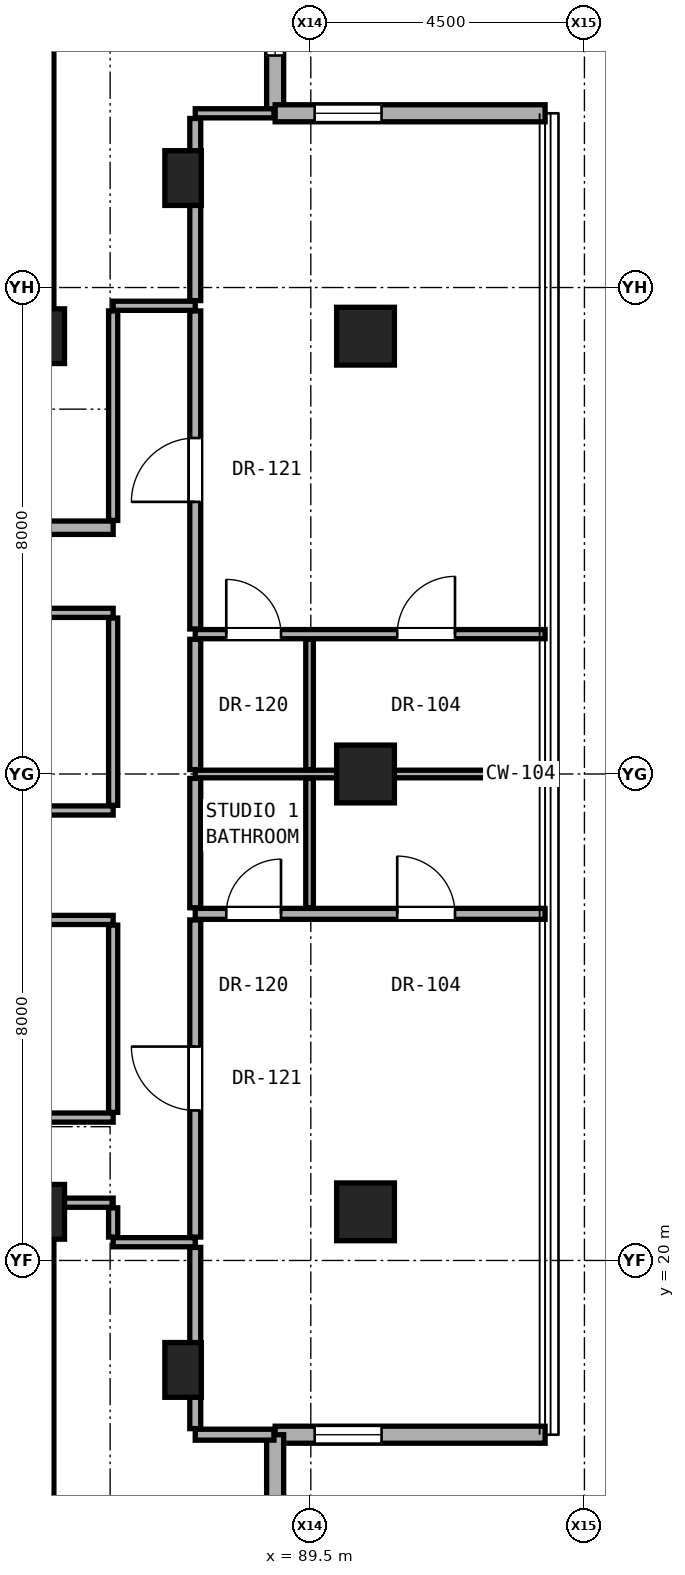
"""IFC4 building model, lengths in metres.
Left out: names, types, materials, properties, quantities, classifications, styles, units other than length and angle.
Written with IfcOpenShell. Run it as: python <this file> out.ifc"""

import sys

from ifc_helpers import new_model, si_unit, direction, frame, frame_2d, origin, origin_2d, place, context, subcontext, project, spatial, rectangle, hollow_rectangle, extrude, element, fill, save


model = new_model("IFC4")
c1 = context("Model", 3, precision=1e-05, world=origin(), true_north=direction((0.0, 1.0)))
c2 = subcontext(c1, "Body", "Model", "MODEL_VIEW")
j1 = project(units=[si_unit("LENGTHUNIT", "METRE"), si_unit("PLANEANGLEUNIT", "RADIAN")], contexts=[c1])
p1 = place(None, origin())
s1 = spatial("IfcSite", under=j1, at=p1, CompositionType="ELEMENT")
p2 = place(p1, origin())
s2 = spatial("IfcBuilding", under=s1, at=p2, CompositionType="ELEMENT")
p3 = place(p2, frame((0.0, 0.0, 190.15)))
s3 = spatial("IfcBuildingStorey", under=s2, at=p3, CompositionType="ELEMENT", Elevation=190.15)
for number, where, z_axis, x_axis in (
    (1, (85.0, 20.8, 0.0), (0.0, 0.0, 1.0), (1.0, 0.0, 0.0)),
    (2, (85.0, 35.2, 0.0), (0.0, 0.0, 1.0), (1.0, 0.0, 0.0)),
):
    element("IfcColumn", number, at=place(p3, frame(where, z_axis=z_axis, x_axis=x_axis)), inside=s3, PredefinedType="COLUMN", context=c2, shape_type="SweptSolid", body=[
        extrude(rectangle(XDim=0.9, YDim=0.9, at=origin_2d()), origin(), (0.0, 0.0, 1.0), 3.25),
    ])
for number, where, z_axis, x_axis in (
    (3, (90.4, 20.8, 0.0), (0.0, 0.0, 1.0), (1.0, 0.0, 0.0)),
    (4, (90.4, 28.0, 0.0), (0.0, 0.0, 1.0), (1.0, 0.0, 0.0)),
    (5, (90.4, 35.2, 0.0), (0.0, 0.0, 1.0), (1.0, 0.0, 0.0)),
):
    element("IfcColumn", number, at=place(p3, frame(where, z_axis=z_axis, x_axis=x_axis)), inside=s3, PredefinedType="COLUMN", context=c2, shape_type="SweptSolid", body=[
        extrude(hollow_rectangle(XDim=0.95, YDim=0.95, WallThickness=0.05, at=origin_2d()), origin(), (0.0, 0.0, 1.0), 3.25),
    ])
for number, where, z_axis, x_axis in (
    (6, (87.4, 18.2, 0.0), (0.0, 0.0, 1.0), (1.0, 0.0, 0.0)),
    (7, (87.4, 37.8, 0.0), (0.0, 0.0, 1.0), (1.0, 0.0, 0.0)),
):
    element("IfcColumn", number, at=place(p3, frame(where, z_axis=z_axis, x_axis=x_axis)), inside=s3, PredefinedType="PILASTER", context=c2, shape_type="SweptSolid", body=[
        extrude(rectangle(XDim=0.6, YDim=0.9, at=origin_2d()), origin(), (0.0, 0.0, 1.0), 3.25),
    ])
for number, where, z_axis, x_axis in (
    (8, (85.0, 35.2, 0.0), (0.0, 0.0, 1.0), (0.0, 1.0, 0.0)),
    (9, (85.0, 15.2, 0.0), (0.0, 0.0, 1.0), (0.0, 1.0, 0.0)),
):
    element("IfcWall", number, at=place(p3, frame(where, z_axis=z_axis, x_axis=x_axis)), inside=s3, PredefinedType="SHEAR", context=c2, shape_type="SweptSolid", body=[
        extrude(rectangle(XDim=5.6, YDim=0.55, at=frame_2d((2.8, 0.0))), origin(), (0.0, 0.0, 1.0), 3.05),
    ])
p4 = place(p3, frame((88.914, 38.865, 0.0), z_axis=(0.0, 0.0, 1.0), x_axis=(0.0, 1.0, 0.0)))
e10 = element("IfcWall", 10, at=p4, inside=s3, PredefinedType="SOLIDWALL", context=c2, shape_type="SweptSolid", body=[
    extrude(rectangle(XDim=4.44, YDim=0.28, at=frame_2d((2.22, 0.0))), origin(), (0.0, 0.0, 1.0), 3.03),
])
p5 = place(p4, frame((0.95, 0.0, 0.85)))
e11 = element("IfcOpeningElement", 11, at=p5, cuts=e10, PredefinedType="OPENING", context=c2, shape_type="SweptSolid", body=[
    extrude(rectangle(XDim=1.1, YDim=2.0, at=frame_2d((0.55, 1.0))), frame((0.0, 0.15, 0.0), z_axis=(0.0, -1.0, 0.0), x_axis=(1.0, 0.0, 0.0)), (0.0, 0.0, 1.0), 0.3),
])
p6 = place(p3, frame((88.914, 17.135, 0.0), z_axis=(0.0, 0.0, 1.0), x_axis=(1.0, 0.0, 0.0)))
e12 = element("IfcWall", 12, at=p6, inside=s3, PredefinedType="SOLIDWALL", context=c2, shape_type="SweptSolid", body=[
    extrude(rectangle(XDim=4.44, YDim=0.28, at=frame_2d((2.22, 0.0))), origin(), (0.0, 0.0, 1.0), 3.03),
])
p7 = place(p6, frame((0.65, 0.0, 0.85)))
e13 = element("IfcOpeningElement", 13, at=p7, cuts=e12, PredefinedType="OPENING", context=c2, shape_type="SweptSolid", body=[
    extrude(rectangle(XDim=1.1, YDim=2.0, at=frame_2d((0.55, 1.0))), frame((0.0, 0.15, 0.0), z_axis=(0.0, -1.0, 0.0), x_axis=(1.0, 0.0, 0.0)), (0.0, 0.0, 1.0), 0.3),
])
p8 = place(p3, frame((88.914, 12.695, 0.0), z_axis=(0.0, 0.0, 1.0), x_axis=(0.0, 1.0, 0.0)))
e14 = element("IfcWall", 14, at=p8, inside=s3, PredefinedType="SOLIDWALL", context=c2, shape_type="SweptSolid", body=[
    extrude(rectangle(XDim=4.44, YDim=0.28, at=frame_2d((2.22, 0.0))), origin(), (0.0, 0.0, 1.0), 3.03),
])
p9 = place(p3, frame((93.354, 38.865, 0.0), z_axis=(0.0, 0.0, 1.0), x_axis=(-1.0, 0.0, 0.0)))
e15 = element("IfcWall", 15, at=p9, inside=s3, PredefinedType="SOLIDWALL", context=c2, shape_type="SweptSolid", body=[
    extrude(rectangle(XDim=4.44, YDim=0.28, at=frame_2d((2.22, 0.0))), origin(), (0.0, 0.0, 1.0), 3.03),
])
p10 = place(p9, frame((2.69, 0.0, 0.85)))
e16 = element("IfcOpeningElement", 16, at=p10, cuts=e15, PredefinedType="OPENING", context=c2, shape_type="SweptSolid", body=[
    extrude(rectangle(XDim=1.1, YDim=2.0, at=frame_2d((0.55, 1.0))), frame((0.0, 0.15, 0.0), z_axis=(0.0, -1.0, 0.0), x_axis=(1.0, 0.0, 0.0)), (0.0, 0.0, 1.0), 0.3),
])
p11 = place(p3, frame((87.6, 17.135, 0.0), z_axis=(0.0, 0.0, 1.0), x_axis=(1.0, 0.0, 0.0)))
e17 = element("IfcWall", 17, at=p11, inside=s3, PredefinedType="PARTITIONING", context=c2, shape_type="SweptSolid", body=[
    extrude(rectangle(XDim=1.294, YDim=0.18, at=frame_2d((0.647, 0.0))), origin(), (0.0, 0.0, 1.0), 3.05),
])
p12 = place(p3, frame((86.25, 20.3, 0.0), z_axis=(0.0, 0.0, 1.0), x_axis=(1.0, 0.0, 0.0)))
e18 = element("IfcWall", 18, at=p12, inside=s3, PredefinedType="PARTITIONING", context=c2, shape_type="SweptSolid", body=[
    extrude(rectangle(XDim=1.35, YDim=0.15, at=frame_2d((0.675, 0.0))), origin(), (0.0, 0.0, 1.0), 3.05),
])
p13 = place(p3, frame((85.27, 20.95, 0.0), z_axis=(0.0, 0.0, 1.0), x_axis=(1.0, 0.0, 0.0)))
e19 = element("IfcWall", 19, at=p13, inside=s3, PredefinedType="PARTITIONING", context=c2, shape_type="SweptSolid", body=[
    extrude(rectangle(XDim=0.98, YDim=0.15, at=frame_2d((0.49, 0.0))), origin(), (0.0, 0.0, 1.0), 2.442),
])
p14 = place(p3, frame((78.64, 22.35, 0.0), z_axis=(0.0, 0.0, 1.0), x_axis=(1.0, 0.0, 0.0)))
e20 = element("IfcWall", 20, at=p14, inside=s3, PredefinedType="PARTITIONING", context=c2, shape_type="SweptSolid", body=[
    extrude(rectangle(XDim=7.61, YDim=0.15, at=frame_2d((3.805, 0.0))), origin(), (0.0, 0.0, 1.0), 2.186),
])
p15 = place(p14, frame((3.33, 0.0, 0.0)))
e21 = element("IfcOpeningElement", 21, at=p15, cuts=e20, PredefinedType="OPENING", context=c2, shape_type="SweptSolid", body=[
    extrude(rectangle(XDim=0.95, YDim=2.15, at=frame_2d((0.475, 1.075))), frame((0.0, 0.085, 0.0), z_axis=(0.0, -1.0, 0.0), x_axis=(1.0, 0.0, 0.0)), (0.0, 0.0, 1.0), 0.17),
])
p16 = place(p3, frame((78.6, 25.6, 0.0), z_axis=(0.0, 0.0, 1.0), x_axis=(1.0, 0.0, 0.0)))
e22 = element("IfcWall", 22, at=p16, inside=s3, PredefinedType="PARTITIONING", context=c2, shape_type="SweptSolid", body=[
    extrude(rectangle(XDim=7.65, YDim=0.15, at=frame_2d((3.825, 0.0))), origin(), (0.0, 0.0, 1.0), 2.186),
])
p17 = place(p3, frame((87.6, 25.7, 0.0), z_axis=(0.0, 0.0, 1.0), x_axis=(1.0, 0.0, 0.0)))
e23 = element("IfcWall", 23, at=p17, inside=s3, PredefinedType="PARTITIONING", context=c2, shape_type="SweptSolid", body=[
    extrude(rectangle(XDim=5.753, YDim=0.18, at=frame_2d((2.876, 0.0))), origin(), (0.0, 0.0, 1.0), 2.269),
])
p18 = place(p17, frame((3.322, 0.0, 0.0)))
e24 = element("IfcOpeningElement", 24, at=p18, cuts=e23, PredefinedType="OPENING", context=c2, shape_type="SweptSolid", body=[
    extrude(rectangle(XDim=0.95, YDim=2.15, at=frame_2d((0.475, 1.075))), frame((0.0, 0.1, 0.0), z_axis=(0.0, -1.0, 0.0), x_axis=(1.0, 0.0, 0.0)), (0.0, 0.0, 1.0), 0.2),
])
p19 = place(p17, frame((0.51, 0.0, 0.0)))
e25 = element("IfcOpeningElement", 25, at=p19, cuts=e23, PredefinedType="OPENING", context=c2, shape_type="SweptSolid", body=[
    extrude(rectangle(XDim=0.9, YDim=2.1, at=frame_2d((0.45, 1.05))), frame((0.0, 0.1, 0.0), z_axis=(0.0, -1.0, 0.0), x_axis=(1.0, 0.0, 0.0)), (0.0, 0.0, 1.0), 0.2),
])
p20 = place(p3, frame((78.6, 27.4, 0.0), z_axis=(0.0, 0.0, 1.0), x_axis=(1.0, 0.0, 0.0)))
e26 = element("IfcWall", 26, at=p20, inside=s3, PredefinedType="PARTITIONING", context=c2, shape_type="SweptSolid", body=[
    extrude(rectangle(XDim=7.65, YDim=0.15, at=frame_2d((3.825, 0.0))), origin(), (0.0, 0.0, 1.0), 2.186),
])
p21 = place(p3, frame((87.6, 28.0, 0.0), z_axis=(0.0, 0.0, 1.0), x_axis=(1.0, 0.0, 0.0)))
e27 = element("IfcWall", 27, at=p21, inside=s3, PredefinedType="PARTITIONING", context=c2, shape_type="SweptSolid", body=[
    extrude(rectangle(XDim=5.753, YDim=0.125, at=frame_2d((2.876, 0.0))), origin(), (0.0, 0.0, 1.0), 2.269),
])
p22 = place(p3, frame((87.6, 30.3, 0.0), z_axis=(0.0, 0.0, 1.0), x_axis=(1.0, 0.0, 0.0)))
e28 = element("IfcWall", 28, at=p22, inside=s3, PredefinedType="PARTITIONING", context=c2, shape_type="SweptSolid", body=[
    extrude(rectangle(XDim=5.753, YDim=0.15, at=frame_2d((2.876, 0.0))), origin(), (0.0, 0.0, 1.0), 2.269),
])
p23 = place(p22, frame((3.322, 0.0, 0.0)))
e29 = element("IfcOpeningElement", 29, at=p23, cuts=e28, PredefinedType="OPENING", context=c2, shape_type="SweptSolid", body=[
    extrude(rectangle(XDim=0.95, YDim=2.15, at=frame_2d((0.475, 1.075))), frame((0.0, 0.085, 0.0), z_axis=(0.0, -1.0, 0.0), x_axis=(1.0, 0.0, 0.0)), (0.0, 0.0, 1.0), 0.17),
])
p24 = place(p22, frame((0.51, 0.0, 0.0)))
e30 = element("IfcOpeningElement", 30, at=p24, cuts=e28, PredefinedType="OPENING", context=c2, shape_type="SweptSolid", body=[
    extrude(rectangle(XDim=0.9, YDim=2.1, at=frame_2d((0.45, 1.05))), frame((0.0, 0.085, 0.0), z_axis=(0.0, -1.0, 0.0), x_axis=(1.0, 0.0, 0.0)), (0.0, 0.0, 1.0), 0.17),
])
p25 = place(p3, frame((78.64, 30.65, 0.0), z_axis=(0.0, 0.0, 1.0), x_axis=(1.0, 0.0, 0.0)))
e31 = element("IfcWall", 31, at=p25, inside=s3, PredefinedType="PARTITIONING", context=c2, shape_type="SweptSolid", body=[
    extrude(rectangle(XDim=7.61, YDim=0.15, at=frame_2d((3.805, 0.0))), origin(), (0.0, 0.0, 1.0), 2.186),
])
p26 = place(p25, frame((3.33, 0.0, 0.0)))
e32 = element("IfcOpeningElement", 32, at=p26, cuts=e31, PredefinedType="OPENING", context=c2, shape_type="SweptSolid", body=[
    extrude(rectangle(XDim=0.95, YDim=2.15, at=frame_2d((0.475, 1.075))), frame((0.0, 0.085, 0.0), z_axis=(0.0, -1.0, 0.0), x_axis=(1.0, 0.0, 0.0)), (0.0, 0.0, 1.0), 0.17),
])
p27 = place(p3, frame((71.55, 32.05, 0.0), z_axis=(0.0, 0.0, 1.0), x_axis=(1.0, 0.0, 0.0)))
e33 = element("IfcWall", 33, at=p27, inside=s3, PredefinedType="SOLIDWALL", context=c2, shape_type="SweptSolid", body=[
    extrude(rectangle(XDim=14.7, YDim=0.22, at=frame_2d((7.35, 0.0))), origin(), (0.0, 0.0, 1.0), 2.186),
])
p28 = place(p27, frame((6.065, 0.0, 0.0)))
e34 = element("IfcOpeningElement", 34, at=p28, cuts=e33, PredefinedType="OPENING", context=c2, shape_type="SweptSolid", body=[
    extrude(rectangle(XDim=0.85, YDim=2.01, at=frame_2d((0.425, 1.005))), frame((0.0, 0.12, 0.0), z_axis=(0.0, -1.0, 0.0), x_axis=(1.0, 0.0, 0.0)), (0.0, 0.0, 1.0), 0.24),
])
p29 = place(p27, frame((10.535, 0.0, 0.0)))
e35 = element("IfcOpeningElement", 35, at=p29, cuts=e33, PredefinedType="OPENING", context=c2, shape_type="SweptSolid", body=[
    extrude(rectangle(XDim=0.95, YDim=2.15, at=frame_2d((0.475, 1.075))), frame((0.0, 0.12, 0.0), z_axis=(0.0, -1.0, 0.0), x_axis=(1.0, 0.0, 0.0)), (0.0, 0.0, 1.0), 0.24),
])
p30 = place(p27, frame((0.7, 0.0, 0.0)))
e36 = element("IfcOpeningElement", 36, at=p30, cuts=e33, PredefinedType="OPENING", context=c2, shape_type="SweptSolid", body=[
    extrude(rectangle(XDim=0.85, YDim=2.01, at=frame_2d((0.425, 1.005))), frame((0.0, 0.12, 0.0), z_axis=(0.0, -1.0, 0.0), x_axis=(1.0, 0.0, 0.0)), (0.0, 0.0, 1.0), 0.24),
])
p31 = place(p27, frame((2.55, 0.0, 0.0)))
e37 = element("IfcOpeningElement", 37, at=p31, cuts=e33, PredefinedType="OPENING", context=c2, shape_type="SweptSolid", body=[
    extrude(rectangle(XDim=0.85, YDim=2.01, at=frame_2d((0.425, 1.005))), frame((0.0, 0.12, 0.0), z_axis=(0.0, -1.0, 0.0), x_axis=(1.0, 0.0, 0.0)), (0.0, 0.0, 1.0), 0.24),
])
p32 = place(p3, frame((86.25, 35.7, 0.0), z_axis=(0.0, 0.0, 1.0), x_axis=(1.0, 0.0, 0.0)))
e38 = element("IfcWall", 38, at=p32, inside=s3, PredefinedType="PARTITIONING", context=c2, shape_type="SweptSolid", body=[
    extrude(rectangle(XDim=1.35, YDim=0.15, at=frame_2d((0.675, 0.0))), origin(), (0.0, 0.0, 1.0), 3.05),
])
p33 = place(p3, frame((87.6, 38.865, 0.0), z_axis=(0.0, 0.0, 1.0), x_axis=(1.0, 0.0, 0.0)))
e39 = element("IfcWall", 39, at=p33, inside=s3, PredefinedType="PARTITIONING", context=c2, shape_type="SweptSolid", body=[
    extrude(rectangle(XDim=1.294, YDim=0.15, at=frame_2d((0.647, 0.0))), origin(), (0.0, 0.0, 1.0), 3.05),
])
p34 = place(p3, frame((86.25, 20.385, 0.0), z_axis=(0.0, 0.0, 1.0), x_axis=(0.0, 1.0, 0.0)))
e40 = element("IfcWall", 40, at=p34, inside=s3, PredefinedType="PARTITIONING", context=c2, shape_type="SweptSolid", body=[
    extrude(rectangle(XDim=0.48, YDim=0.15, at=frame_2d((0.24, 0.0))), origin(), (0.0, 0.0, 1.0), 2.442),
])
p35 = place(p3, frame((86.25, 22.435, 0.0), z_axis=(0.0, 0.0, 1.0), x_axis=(0.0, 1.0, 0.0)))
e41 = element("IfcWall", 41, at=p35, inside=s3, PredefinedType="PARTITIONING", context=c2, shape_type="SweptSolid", body=[
    extrude(rectangle(XDim=3.08, YDim=0.15, at=frame_2d((1.54, 0.0))), origin(), (0.0, 0.0, 1.0), 3.05),
])
p36 = place(p3, frame((86.25, 27.485, 0.0), z_axis=(0.0, 0.0, 1.0), x_axis=(0.0, 1.0, 0.0)))
e42 = element("IfcWall", 42, at=p36, inside=s3, PredefinedType="PARTITIONING", context=c2, shape_type="SweptSolid", body=[
    extrude(rectangle(XDim=3.08, YDim=0.15, at=frame_2d((1.54, 0.0))), origin(), (0.0, 0.0, 1.0), 2.346),
])
p37 = place(p3, frame((86.25, 32.17, 0.0), z_axis=(0.0, 0.0, 1.0), x_axis=(0.0, 1.0, 0.0)))
e43 = element("IfcWall", 43, at=p37, inside=s3, PredefinedType="PARTITIONING", context=c2, shape_type="SweptSolid", body=[
    extrude(rectangle(XDim=3.445, YDim=0.15, at=frame_2d((1.723, 0.0))), origin(), (0.0, 0.0, 1.0), 2.442),
])
p38 = place(p3, frame((87.6, 17.235, 0.0), z_axis=(0.0, 0.0, 1.0), x_axis=(0.0, 1.0, 0.0)))
e44 = element("IfcWall", 44, at=p38, inside=s3, PredefinedType="PARTITIONING", context=c2, shape_type="SweptSolid", body=[
    extrude(rectangle(XDim=2.98, YDim=0.18, at=frame_2d((1.49, 0.0))), origin(), (0.0, 0.0, 1.0), 2.493),
])
p39 = place(p3, frame((87.6, 20.385, 0.0), z_axis=(0.0, 0.0, 1.0), x_axis=(0.0, 1.0, 0.0)))
e45 = element("IfcWall", 45, at=p39, inside=s3, PredefinedType="PARTITIONING", context=c2, shape_type="SweptSolid", body=[
    extrude(rectangle(XDim=5.215, YDim=0.18, at=frame_2d((2.607, 0.0))), origin(), (0.0, 0.0, 1.0), 2.442),
])
p40 = place(p39, frame((2.083, 0.0, 0.0)))
e46 = element("IfcOpeningElement", 46, at=p40, cuts=e45, PredefinedType="OPENING", context=c2, shape_type="SweptSolid", body=[
    extrude(rectangle(XDim=1.05, YDim=2.2, at=frame_2d((0.525, 1.1))), frame((0.0, 0.1, 0.0), z_axis=(0.0, -1.0, 0.0), x_axis=(1.0, 0.0, 0.0)), (0.0, 0.0, 1.0), 0.2),
])
p41 = place(p3, frame((87.6, 25.8, 0.0), z_axis=(0.0, 0.0, 1.0), x_axis=(0.0, 1.0, 0.0)))
e47 = element("IfcWall", 47, at=p41, inside=s3, PredefinedType="PARTITIONING", context=c2, shape_type="SweptSolid", body=[
    extrude(rectangle(XDim=2.127, YDim=0.18, at=frame_2d((1.064, 0.0))), origin(), (0.0, 0.0, 1.0), 2.346),
])
p42 = place(p3, frame((87.6, 28.073, 0.0), z_axis=(0.0, 0.0, 1.0), x_axis=(0.0, 1.0, 0.0)))
e48 = element("IfcWall", 48, at=p42, inside=s3, PredefinedType="PARTITIONING", context=c2, shape_type="SweptSolid", body=[
    extrude(rectangle(XDim=2.143, YDim=0.18, at=frame_2d((1.071, 0.0))), origin(), (0.0, 0.0, 1.0), 2.346),
])
p43 = place(p3, frame((87.6, 30.385, 0.0), z_axis=(0.0, 0.0, 1.0), x_axis=(0.0, 1.0, 0.0)))
e49 = element("IfcWall", 49, at=p43, inside=s3, PredefinedType="PARTITIONING", context=c2, shape_type="SweptSolid", body=[
    extrude(rectangle(XDim=5.23, YDim=0.18, at=frame_2d((2.615, 0.0))), origin(), (0.0, 0.0, 1.0), 2.442),
])
p44 = place(p43, frame((2.09, 0.0, 0.0)))
e50 = element("IfcOpeningElement", 50, at=p44, cuts=e49, PredefinedType="OPENING", context=c2, shape_type="SweptSolid", body=[
    extrude(rectangle(XDim=1.05, YDim=2.2, at=frame_2d((0.525, 1.1))), frame((0.0, 0.1, 0.0), z_axis=(0.0, -1.0, 0.0), x_axis=(1.0, 0.0, 0.0)), (0.0, 0.0, 1.0), 0.2),
])
p45 = place(p3, frame((87.6, 35.785, 0.0), z_axis=(0.0, 0.0, 1.0), x_axis=(0.0, 1.0, 0.0)))
e51 = element("IfcWall", 51, at=p45, inside=s3, PredefinedType="PARTITIONING", context=c2, shape_type="SweptSolid", body=[
    extrude(rectangle(XDim=2.995, YDim=0.18, at=frame_2d((1.498, 0.0))), origin(), (0.0, 0.0, 1.0), 2.493),
])
p46 = place(p3, frame((89.48, 25.8, 0.0), z_axis=(0.0, 0.0, 1.0), x_axis=(0.0, 1.0, 0.0)))
e52 = element("IfcWall", 52, at=p46, inside=s3, PredefinedType="PARTITIONING", context=c2, shape_type="SweptSolid", body=[
    extrude(rectangle(XDim=2.127, YDim=0.125, at=frame_2d((1.064, 0.0))), origin(), (0.0, 0.0, 1.0), 2.346),
])
p47 = place(p3, frame((89.48, 28.073, 0.0), z_axis=(0.0, 0.0, 1.0), x_axis=(0.0, 1.0, 0.0)))
e53 = element("IfcWall", 53, at=p47, inside=s3, PredefinedType="PARTITIONING", context=c2, shape_type="SweptSolid", body=[
    extrude(rectangle(XDim=2.143, YDim=0.125, at=frame_2d((1.071, 0.0))), origin(), (0.0, 0.0, 1.0), 2.346),
])
p48 = place(p5, origin())
e54 = element("IfcWindow", 54, at=p48, inside=s3, PartitioningType="SINGLE_PANEL", PredefinedType="WINDOW", context=c2, shape_type="SweptSolid", body=[
    extrude(rectangle(XDim=1.1, YDim=2.0, at=frame_2d((0.55, 1.0))), frame((0.0, 0.03, 0.0), z_axis=(0.0, -1.0, 0.0), x_axis=(1.0, 0.0, 0.0)), (0.0, 0.0, 1.0), 0.06),
])
fill(e11, e54)
p49 = place(p7, origin())
e55 = element("IfcWindow", 55, at=p49, inside=s3, PartitioningType="SINGLE_PANEL", PredefinedType="WINDOW", context=c2, shape_type="SweptSolid", body=[
    extrude(rectangle(XDim=1.1, YDim=2.0, at=frame_2d((0.55, 1.0))), frame((0.0, 0.03, 0.0), z_axis=(0.0, -1.0, 0.0), x_axis=(1.0, 0.0, 0.0)), (0.0, 0.0, 1.0), 0.06),
])
fill(e13, e55)
p50 = place(p10, origin())
e56 = element("IfcWindow", 56, at=p50, inside=s3, PartitioningType="SINGLE_PANEL", PredefinedType="WINDOW", context=c2, shape_type="SweptSolid", body=[
    extrude(rectangle(XDim=1.1, YDim=2.0, at=frame_2d((0.55, 1.0))), frame((0.0, 0.03, 0.0), z_axis=(0.0, -1.0, 0.0), x_axis=(1.0, 0.0, 0.0)), (0.0, 0.0, 1.0), 0.06),
])
fill(e16, e56)
p51 = place(p40, origin())
e57 = element("IfcDoor", 57, at=p51, inside=s3, OperationType="SINGLE_SWING_RIGHT", PredefinedType="DOOR", context=c2, shape_type="SweptSolid", body=[
    extrude(rectangle(XDim=1.05, YDim=2.2, at=frame_2d((0.525, 1.1))), frame((0.0, 0.025, 0.0), z_axis=(0.0, -1.0, 0.0), x_axis=(1.0, 0.0, 0.0)), (0.0, 0.0, 1.0), 0.05),
])
fill(e46, e57)
p52 = place(p18, origin())
e58 = element("IfcDoor", 58, at=p52, inside=s3, OperationType="SINGLE_SWING_LEFT", PredefinedType="DOOR", context=c2, shape_type="SweptSolid", body=[
    extrude(rectangle(XDim=0.95, YDim=2.15, at=frame_2d((0.475, 1.075))), frame((0.0, 0.025, 0.0), z_axis=(0.0, -1.0, 0.0), x_axis=(1.0, 0.0, 0.0)), (0.0, 0.0, 1.0), 0.05),
])
fill(e24, e58)
p53 = place(p19, origin())
e59 = element("IfcDoor", 59, at=p53, inside=s3, OperationType="SINGLE_SWING_RIGHT", PredefinedType="DOOR", context=c2, shape_type="SweptSolid", body=[
    extrude(rectangle(XDim=0.9, YDim=2.1, at=frame_2d((0.45, 1.05))), frame((0.0, 0.025, 0.0), z_axis=(0.0, -1.0, 0.0), x_axis=(1.0, 0.0, 0.0)), (0.0, 0.0, 1.0), 0.05),
])
fill(e25, e59)
p54 = place(p44, origin())
e60 = element("IfcDoor", 60, at=p54, inside=s3, OperationType="SINGLE_SWING_LEFT", PredefinedType="DOOR", context=c2, shape_type="SweptSolid", body=[
    extrude(rectangle(XDim=1.05, YDim=2.2, at=frame_2d((0.525, 1.1))), frame((0.0, 0.025, 0.0), z_axis=(0.0, -1.0, 0.0), x_axis=(1.0, 0.0, 0.0)), (0.0, 0.0, 1.0), 0.05),
])
fill(e50, e60)
p55 = place(p23, origin())
e61 = element("IfcDoor", 61, at=p55, inside=s3, OperationType="SINGLE_SWING_RIGHT", PredefinedType="DOOR", context=c2, shape_type="SweptSolid", body=[
    extrude(rectangle(XDim=0.95, YDim=2.15, at=frame_2d((0.475, 1.075))), frame((0.0, 0.025, 0.0), z_axis=(0.0, -1.0, 0.0), x_axis=(1.0, 0.0, 0.0)), (0.0, 0.0, 1.0), 0.05),
])
fill(e29, e61)
p56 = place(p24, origin())
e62 = element("IfcDoor", 62, at=p56, inside=s3, OperationType="SINGLE_SWING_LEFT", PredefinedType="DOOR", context=c2, shape_type="SweptSolid", body=[
    extrude(rectangle(XDim=0.9, YDim=2.1, at=frame_2d((0.45, 1.05))), frame((0.0, 0.025, 0.0), z_axis=(0.0, -1.0, 0.0), x_axis=(1.0, 0.0, 0.0)), (0.0, 0.0, 1.0), 0.05),
])
fill(e30, e62)
save(model, sys.argv[1])
